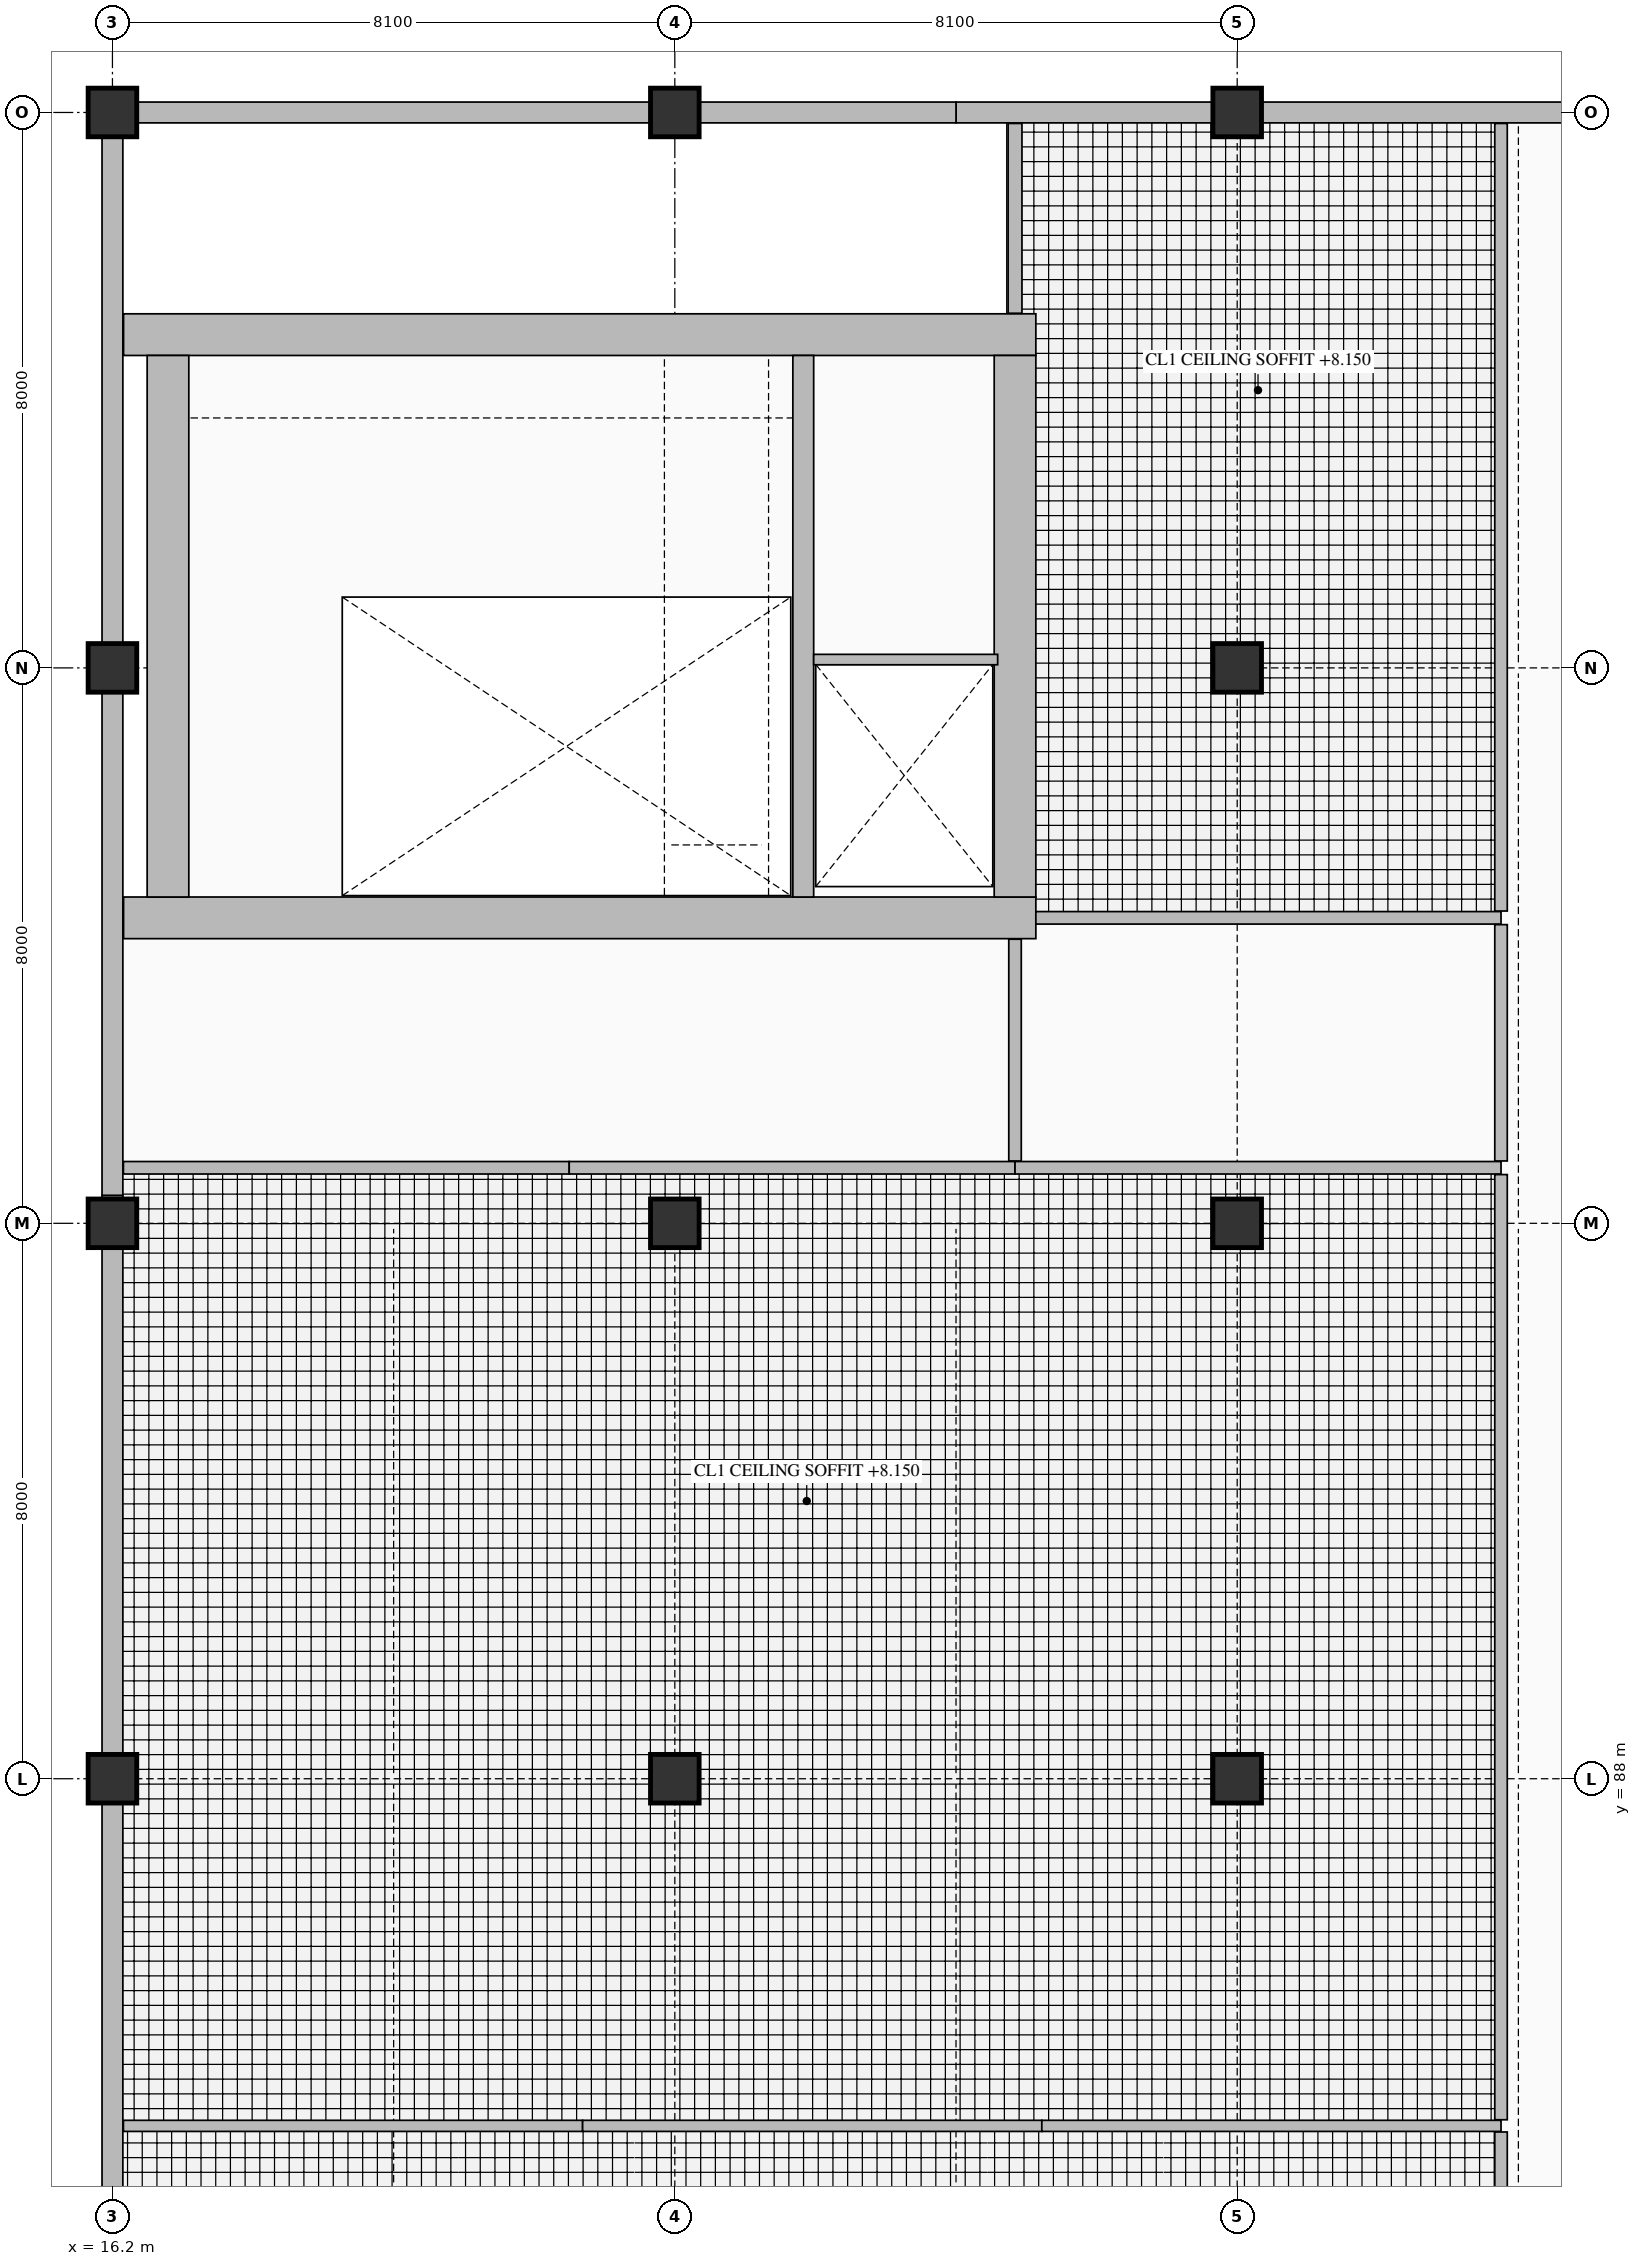
"""IFC4 building model, lengths in metres.
Left out: names, types, materials, properties, quantities, classifications, styles, units other than length and angle.
Written with IfcOpenShell. Run it as: python <this file> out.ifc"""

import sys

from ifc_helpers import new_model, si_unit, direction, frame, frame_2d, origin, origin_2d, place, context, subcontext, project, spatial, rectangle, extrude, element, fill, save


model = new_model("IFC4")
c1 = context("Model", 3, precision=1e-05, world=origin(), true_north=direction((0.0, 1.0)))
c2 = subcontext(c1, "Body", "Model", "MODEL_VIEW")
j1 = project(units=[si_unit("LENGTHUNIT", "METRE"), si_unit("PLANEANGLEUNIT", "RADIAN")], contexts=[c1])
p1 = place(None, origin())
s1 = spatial("IfcSite", under=j1, at=p1, CompositionType="ELEMENT")
p2 = place(p1, origin())
s2 = spatial("IfcBuilding", under=s1, at=p2, CompositionType="ELEMENT")
p3 = place(p2, frame((0.0, 0.0, 5.4)))
s3 = spatial("IfcBuildingStorey", under=s2, at=p3, CompositionType="ELEMENT", Elevation=5.4)
p4 = place(p3, frame((16.36, 100.4, 0.0), z_axis=(0.0, 0.0, 1.0), x_axis=(1.0, 0.0, 0.0)))
e1 = element("IfcWall", 1, at=p4, inside=s3, PredefinedType="SHEAR", context=c2, shape_type="SweptSolid", body=[
    extrude(rectangle(XDim=13.14, YDim=0.6, at=frame_2d((6.57, 0.0))), origin(), (0.0, 0.0, 1.0), 4.8),
])
p5 = place(p4, frame((1.39, 0.0, 0.0)))
e2 = element("IfcOpeningElement", 2, at=p5, cuts=e1, PredefinedType="OPENING", context=c2, shape_type="SweptSolid", body=[
    extrude(rectangle(XDim=1.15, YDim=2.25, at=frame_2d((0.575, 1.125))), frame((0.0, 0.31, 0.0), z_axis=(0.0, -1.0, 0.0), x_axis=(1.0, 0.0, 0.0)), (0.0, 0.0, 1.0), 0.62),
])
p6 = place(p4, frame((10.695, 0.0, 0.0)))
e3 = element("IfcOpeningElement", 3, at=p6, cuts=e1, PredefinedType="OPENING", context=c2, shape_type="SweptSolid", body=[
    extrude(rectangle(XDim=1.1, YDim=2.2, at=frame_2d((0.55, 1.1))), frame((0.0, 0.31, 0.0), z_axis=(0.0, -1.0, 0.0), x_axis=(1.0, 0.0, 0.0)), (0.0, 0.0, 1.0), 0.62),
])
p7 = place(p3, frame((16.36, 108.8, 0.0), z_axis=(0.0, 0.0, 1.0), x_axis=(1.0, 0.0, 0.0)))
e4 = element("IfcWall", 4, at=p7, inside=s3, PredefinedType="SHEAR", context=c2, shape_type="SweptSolid", body=[
    extrude(rectangle(XDim=13.14, YDim=0.6, at=frame_2d((6.57, 0.0))), origin(), (0.0, 0.0, 1.0), 4.8),
])
for number, where, z_axis, x_axis in (
    (5, (17.0, 100.7, 0.0), (0.0, 0.0, 1.0), (0.0, 1.0, 0.0)),
    (6, (29.2, 100.7, 0.0), (0.0, 0.0, 1.0), (0.0, 1.0, 0.0)),
):
    element("IfcWall", number, at=place(p3, frame(where, z_axis=z_axis, x_axis=x_axis)), inside=s3, PredefinedType="SHEAR", context=c2, shape_type="SweptSolid", body=[
        extrude(rectangle(XDim=7.8, YDim=0.6, at=frame_2d((3.9, 0.0))), origin(), (0.0, 0.0, 1.0), 4.8),
    ])
p8 = place(p3, frame((26.15, 100.7, 0.0), z_axis=(0.0, 0.0, 1.0), x_axis=(0.0, 1.0, 0.0)))
e7 = element("IfcWall", 7, at=p8, inside=s3, PredefinedType="SHEAR", context=c2, shape_type="SweptSolid", body=[
    extrude(rectangle(XDim=7.8, YDim=0.3, at=frame_2d((3.9, 0.0))), origin(), (0.0, 0.0, 1.0), 4.8),
])
for number, where, z_axis, x_axis in (
    (8, (16.2, 88.0, 0.0), (0.0, 0.0, 1.0), (1.0, 0.0, 0.0)),
    (9, (16.2, 96.0, 0.0), (0.0, 0.0, 1.0), (1.0, 0.0, 0.0)),
    (10, (16.2, 104.0, 0.0), (0.0, 0.0, 1.0), (1.0, 0.0, 0.0)),
    (11, (16.2, 112.0, 0.0), (0.0, 0.0, 1.0), (1.0, 0.0, 0.0)),
    (12, (24.3, 88.0, 0.0), (0.0, 0.0, 1.0), (1.0, 0.0, 0.0)),
    (13, (24.3, 96.0, 0.0), (0.0, 0.0, 1.0), (1.0, 0.0, 0.0)),
    (14, (24.3, 112.0, 0.0), (0.0, 0.0, 1.0), (1.0, 0.0, 0.0)),
    (15, (32.4, 88.0, 0.0), (0.0, 0.0, 1.0), (1.0, 0.0, 0.0)),
    (16, (32.4, 96.0, 0.0), (0.0, 0.0, 1.0), (1.0, 0.0, 0.0)),
    (17, (32.4, 104.0, 0.0), (0.0, 0.0, 1.0), (1.0, 0.0, 0.0)),
    (18, (32.4, 112.0, 0.0), (0.0, 0.0, 1.0), (1.0, 0.0, 0.0)),
):
    element("IfcColumn", number, at=place(p3, frame(where, z_axis=z_axis, x_axis=x_axis)), inside=s3, PredefinedType="COLUMN", context=c2, shape_type="SweptSolid", body=[
        extrude(rectangle(XDim=0.7, YDim=0.7, at=origin_2d()), origin(), (0.0, 0.0, 1.0), 4.8),
    ])
p9 = place(p3, frame((40.5, 112.0, 0.0), z_axis=(0.0, 0.0, 1.0), x_axis=(-1.0, 0.0, 0.0)))
e19 = element("IfcWall", 19, at=p9, inside=s3, PredefinedType="SOLIDWALL", context=c2, shape_type="SweptSolid", body=[
    extrude(rectangle(XDim=12.15, YDim=0.3, at=frame_2d((6.075, 0.0))), origin(), (0.0, 0.0, 1.0), 3.812),
])
p10 = place(p9, frame((5.4, 0.0, 0.85)))
e20 = element("IfcOpeningElement", 20, at=p10, cuts=e19, PredefinedType="OPENING", context=c2, shape_type="SweptSolid", body=[
    extrude(rectangle(XDim=0.9, YDim=2.1, at=frame_2d((0.45, 1.05))), frame((0.0, 0.16, 0.0), z_axis=(0.0, -1.0, 0.0), x_axis=(1.0, 0.0, 0.0)), (0.0, 0.0, 1.0), 0.32),
])
p11 = place(p3, frame((28.35, 112.0, 0.0), z_axis=(0.0, 0.0, 1.0), x_axis=(-1.0, 0.0, 0.0)))
e21 = element("IfcWall", 21, at=p11, inside=s3, PredefinedType="SOLIDWALL", context=c2, shape_type="SweptSolid", body=[
    extrude(rectangle(XDim=12.15, YDim=0.3, at=frame_2d((6.075, 0.0))), origin(), (0.0, 0.0, 1.0), 3.812),
])
p12 = place(p11, frame((5.4, 0.0, 0.85)))
e22 = element("IfcOpeningElement", 22, at=p12, cuts=e21, PredefinedType="OPENING", context=c2, shape_type="SweptSolid", body=[
    extrude(rectangle(XDim=0.9, YDim=2.4, at=frame_2d((0.45, 1.2))), frame((0.0, 0.16, 0.0), z_axis=(0.0, -1.0, 0.0), x_axis=(1.0, 0.0, 0.0)), (0.0, 0.0, 1.0), 0.32),
])
p13 = place(p3, frame((16.2, 112.0, 0.0), z_axis=(0.0, 0.0, 1.0), x_axis=(0.0, -1.0, 0.0)))
e23 = element("IfcWall", 23, at=p13, inside=s3, PredefinedType="SOLIDWALL", context=c2, shape_type="SweptSolid", body=[
    extrude(rectangle(XDim=15.6, YDim=0.3, at=frame_2d((7.8, 0.0))), origin(), (0.0, 0.0, 1.0), 3.912),
])
p14 = place(p3, frame((16.2, 96.4, 0.0), z_axis=(0.0, 0.0, 1.0), x_axis=(0.0, -1.0, 0.0)))
e24 = element("IfcWall", 24, at=p14, inside=s3, PredefinedType="SOLIDWALL", context=c2, shape_type="SweptSolid", body=[
    extrude(rectangle(XDim=15.6, YDim=0.3, at=frame_2d((7.8, 0.0))), origin(), (0.0, 0.0, 1.0), 3.912),
])
p15 = place(p14, frame((4.5, 0.0, 0.95)))
e25 = element("IfcOpeningElement", 25, at=p15, cuts=e24, PredefinedType="OPENING", context=c2, shape_type="SweptSolid", body=[
    extrude(rectangle(XDim=1.2, YDim=1.8, at=frame_2d((0.6, 0.9))), frame((0.0, 0.16, 0.0), z_axis=(0.0, -1.0, 0.0), x_axis=(1.0, 0.0, 0.0)), (0.0, 0.0, 1.0), 0.32),
])
p16 = place(p3, frame((26.3, 104.12, 0.0), z_axis=(0.0, 0.0, 1.0), x_axis=(1.0, 0.0, 0.0)))
e26 = element("IfcWall", 26, at=p16, inside=s3, PredefinedType="PARTITIONING", context=c2, shape_type="SweptSolid", body=[
    extrude(rectangle(XDim=2.65, YDim=0.15, at=frame_2d((1.325, 0.0))), origin(), (0.0, 0.0, 1.0), 4.52),
])
for number, where, z_axis, x_axis in (
    (27, (16.358, 83.0, 0.0), (0.0, 0.0, 1.0), (1.0, 0.0, 0.0)),
    (28, (22.972, 83.0, 0.0), (0.0, 0.0, 1.0), (1.0, 0.0, 0.0)),
    (29, (29.586, 83.0, 0.0), (0.0, 0.0, 1.0), (1.0, 0.0, 0.0)),
):
    element("IfcWall", number, at=place(p3, frame(where, z_axis=z_axis, x_axis=x_axis)), inside=s3, PredefinedType="PARTITIONING", context=c2, shape_type="SweptSolid", body=[
        extrude(rectangle(XDim=6.614, YDim=0.16, at=frame_2d((3.307, 0.0))), origin(), (0.0, 0.0, 1.0), 4.52),
    ])
p17 = place(p3, frame((16.358, 96.8, 0.0), z_axis=(0.0, 0.0, 1.0), x_axis=(1.0, 0.0, 0.0)))
e30 = element("IfcWall", 30, at=p17, inside=s3, PredefinedType="PARTITIONING", context=c2, shape_type="SweptSolid", body=[
    extrude(rectangle(XDim=6.421, YDim=0.18, at=frame_2d((3.21, 0.0))), origin(), (0.0, 0.0, 1.0), 4.52),
])
p18 = place(p3, frame((22.779, 96.8, 0.0), z_axis=(0.0, 0.0, 1.0), x_axis=(1.0, 0.0, 0.0)))
e31 = element("IfcWall", 31, at=p18, inside=s3, PredefinedType="PARTITIONING", context=c2, shape_type="SweptSolid", body=[
    extrude(rectangle(XDim=6.421, YDim=0.18, at=frame_2d((3.21, 0.0))), origin(), (0.0, 0.0, 1.0), 4.52),
])
p19 = place(p3, frame((29.2, 96.8, 0.0), z_axis=(0.0, 0.0, 1.0), x_axis=(1.0, 0.0, 0.0)))
e32 = element("IfcWall", 32, at=p19, inside=s3, PredefinedType="PARTITIONING", context=c2, shape_type="SweptSolid", body=[
    extrude(rectangle(XDim=7.0, YDim=0.18, at=frame_2d((3.5, 0.0))), origin(), (0.0, 0.0, 1.0), 4.52),
])
p20 = place(p3, frame((29.5, 100.4, 0.0), z_axis=(0.0, 0.0, 1.0), x_axis=(1.0, 0.0, 0.0)))
e33 = element("IfcWall", 33, at=p20, inside=s3, PredefinedType="PARTITIONING", context=c2, shape_type="SweptSolid", body=[
    extrude(rectangle(XDim=6.7, YDim=0.18, at=frame_2d((3.35, 0.0))), origin(), (0.0, 0.0, 1.0), 4.52),
])
p21 = place(p3, frame((29.2, 96.898, 0.0), z_axis=(0.0, 0.0, 1.0), x_axis=(0.0, 1.0, 0.0)))
e34 = element("IfcWall", 34, at=p21, inside=s3, PredefinedType="PARTITIONING", context=c2, shape_type="SweptSolid", body=[
    extrude(rectangle(XDim=3.194, YDim=0.18, at=frame_2d((1.597, 0.0))), origin(), (0.0, 0.0, 1.0), 4.52),
])
p22 = place(p21, frame((0.997, 0.0, 0.0)))
e35 = element("IfcOpeningElement", 35, at=p22, cuts=e34, PredefinedType="OPENING", context=c2, shape_type="SweptSolid", body=[
    extrude(rectangle(XDim=1.2, YDim=2.2, at=frame_2d((0.6, 1.1))), frame((0.0, 0.1, 0.0), z_axis=(0.0, -1.0, 0.0), x_axis=(1.0, 0.0, 0.0)), (0.0, 0.0, 1.0), 0.2),
])
p23 = place(p3, frame((29.2, 109.108, 0.0), z_axis=(0.0, 0.0, 1.0), x_axis=(0.0, 1.0, 0.0)))
e36 = element("IfcWall", 36, at=p23, inside=s3, PredefinedType="PARTITIONING", context=c2, shape_type="SweptSolid", body=[
    extrude(rectangle(XDim=2.734, YDim=0.2, at=frame_2d((1.367, 0.0))), origin(), (0.0, 0.0, 1.0), 4.52),
])
p24 = place(p3, frame((36.2, 68.888, 0.0), z_axis=(0.0, 0.0, 1.0), x_axis=(0.0, 1.0, 0.0)))
e37 = element("IfcWall", 37, at=p24, inside=s3, PredefinedType="PARTITIONING", context=c2, shape_type="SweptSolid", body=[
    extrude(rectangle(XDim=14.024, YDim=0.18, at=frame_2d((7.012, 0.0))), origin(), (0.0, 0.0, 1.0), 4.165),
])
p25 = place(p24, frame((6.512, 0.0, 0.0)))
e38 = element("IfcOpeningElement", 38, at=p25, cuts=e37, PredefinedType="OPENING", context=c2, shape_type="SweptSolid", body=[
    extrude(rectangle(XDim=1.0, YDim=2.2, at=frame_2d((0.5, 1.1))), frame((0.0, 0.1, 0.0), z_axis=(0.0, -1.0, 0.0), x_axis=(1.0, 0.0, 0.0)), (0.0, 0.0, 1.0), 0.2),
])
p26 = place(p3, frame((36.2, 83.088, 0.0), z_axis=(0.0, 0.0, 1.0), x_axis=(0.0, 1.0, 0.0)))
e39 = element("IfcWall", 39, at=p26, inside=s3, PredefinedType="PARTITIONING", context=c2, shape_type="SweptSolid", body=[
    extrude(rectangle(XDim=13.614, YDim=0.18, at=frame_2d((6.807, 0.0))), origin(), (0.0, 0.0, 1.0), 4.165),
])
p27 = place(p26, frame((6.307, 0.0, 0.0)))
e40 = element("IfcOpeningElement", 40, at=p27, cuts=e39, PredefinedType="OPENING", context=c2, shape_type="SweptSolid", body=[
    extrude(rectangle(XDim=1.0, YDim=2.2, at=frame_2d((0.5, 1.1))), frame((0.0, 0.1, 0.0), z_axis=(0.0, -1.0, 0.0), x_axis=(1.0, 0.0, 0.0)), (0.0, 0.0, 1.0), 0.2),
])
p28 = place(p3, frame((36.2, 96.898, 0.0), z_axis=(0.0, 0.0, 1.0), x_axis=(0.0, 1.0, 0.0)))
e41 = element("IfcWall", 41, at=p28, inside=s3, PredefinedType="PARTITIONING", context=c2, shape_type="SweptSolid", body=[
    extrude(rectangle(XDim=3.404, YDim=0.18, at=frame_2d((1.702, 0.0))), origin(), (0.0, 0.0, 1.0), 4.158),
])
p29 = place(p28, frame((1.152, 0.0, 0.0)))
e42 = element("IfcOpeningElement", 42, at=p29, cuts=e41, PredefinedType="OPENING", context=c2, shape_type="SweptSolid", body=[
    extrude(rectangle(XDim=1.1, YDim=2.2, at=frame_2d((0.55, 1.1))), frame((0.0, 0.1, 0.0), z_axis=(0.0, -1.0, 0.0), x_axis=(1.0, 0.0, 0.0)), (0.0, 0.0, 1.0), 0.2),
])
p30 = place(p3, frame((36.2, 100.498, 0.0), z_axis=(0.0, 0.0, 1.0), x_axis=(0.0, 1.0, 0.0)))
e43 = element("IfcWall", 43, at=p30, inside=s3, PredefinedType="PARTITIONING", context=c2, shape_type="SweptSolid", body=[
    extrude(rectangle(XDim=11.344, YDim=0.18, at=frame_2d((5.672, 0.0))), origin(), (0.0, 0.0, 1.0), 4.158),
])
p31 = place(p30, frame((5.197, 0.0, 0.0)))
e44 = element("IfcOpeningElement", 44, at=p31, cuts=e43, PredefinedType="OPENING", context=c2, shape_type="SweptSolid", body=[
    extrude(rectangle(XDim=0.95, YDim=2.15, at=frame_2d((0.475, 1.075))), frame((0.0, 0.1, 0.0), z_axis=(0.0, -1.0, 0.0), x_axis=(1.0, 0.0, 0.0)), (0.0, 0.0, 1.0), 0.2),
])
p32 = place(p10, origin())
e45 = element("IfcWindow", 45, at=p32, inside=s3, PartitioningType="SINGLE_PANEL", PredefinedType="WINDOW", context=c2, shape_type="SweptSolid", body=[
    extrude(rectangle(XDim=0.9, YDim=2.1, at=frame_2d((0.45, 1.05))), frame((0.0, 0.03, 0.0), z_axis=(0.0, -1.0, 0.0), x_axis=(1.0, 0.0, 0.0)), (0.0, 0.0, 1.0), 0.06),
])
fill(e20, e45)
p33 = place(p12, origin())
e46 = element("IfcWindow", 46, at=p33, inside=s3, PartitioningType="DOUBLE_PANEL_HORIZONTAL", PredefinedType="WINDOW", context=c2, shape_type="SweptSolid", body=[
    extrude(rectangle(XDim=0.9, YDim=2.4, at=frame_2d((0.45, 1.2))), frame((0.0, 0.03, 0.0), z_axis=(0.0, -1.0, 0.0), x_axis=(1.0, 0.0, 0.0)), (0.0, 0.0, 1.0), 0.06),
])
fill(e22, e46)
p34 = place(p15, origin())
e47 = element("IfcWindow", 47, at=p34, inside=s3, PartitioningType="SINGLE_PANEL", PredefinedType="WINDOW", context=c2, shape_type="SweptSolid", body=[
    extrude(rectangle(XDim=1.2, YDim=1.8, at=frame_2d((0.6, 0.9))), frame((0.0, 0.03, 0.0), z_axis=(0.0, -1.0, 0.0), x_axis=(1.0, 0.0, 0.0)), (0.0, 0.0, 1.0), 0.06),
])
fill(e25, e47)
p35 = place(p5, origin())
e48 = element("IfcDoor", 48, at=p35, inside=s3, OperationType="SINGLE_SWING_LEFT", PredefinedType="DOOR", context=c2, shape_type="SweptSolid", body=[
    extrude(rectangle(XDim=1.15, YDim=2.25, at=frame_2d((0.575, 1.125))), frame((0.0, 0.025, 0.0), z_axis=(0.0, -1.0, 0.0), x_axis=(1.0, 0.0, 0.0)), (0.0, 0.0, 1.0), 0.05),
])
fill(e2, e48)
p36 = place(p6, frame((1.1, 0.0, 0.0), z_axis=(0.0, 0.0, 1.0), x_axis=(-1.0, 0.0, 0.0)))
e49 = element("IfcDoor", 49, at=p36, inside=s3, OperationType="DOUBLE_DOOR_SLIDING", PredefinedType="DOOR", context=c2, shape_type="SweptSolid", body=[
    extrude(rectangle(XDim=1.1, YDim=2.2, at=frame_2d((0.55, 1.1))), frame((0.0, 0.025, 0.0), z_axis=(0.0, -1.0, 0.0), x_axis=(1.0, 0.0, 0.0)), (0.0, 0.0, 1.0), 0.05),
])
fill(e3, e49)
p37 = place(p22, frame((1.2, 0.0, 0.0), z_axis=(0.0, 0.0, 1.0), x_axis=(-1.0, 0.0, 0.0)))
e50 = element("IfcDoor", 50, at=p37, inside=s3, OperationType="SINGLE_SWING_RIGHT", PredefinedType="DOOR", context=c2, shape_type="SweptSolid", body=[
    extrude(rectangle(XDim=1.2, YDim=2.2, at=frame_2d((0.6, 1.1))), frame((0.0, 0.025, 0.0), z_axis=(0.0, -1.0, 0.0), x_axis=(1.0, 0.0, 0.0)), (0.0, 0.0, 1.0), 0.05),
])
fill(e35, e50)
p38 = place(p27, origin())
e51 = element("IfcDoor", 51, at=p38, inside=s3, OperationType="SINGLE_SWING_LEFT", PredefinedType="DOOR", context=c2, shape_type="SweptSolid", body=[
    extrude(rectangle(XDim=1.0, YDim=2.2, at=frame_2d((0.5, 1.1))), frame((0.0, 0.025, 0.0), z_axis=(0.0, -1.0, 0.0), x_axis=(1.0, 0.0, 0.0)), (0.0, 0.0, 1.0), 0.05),
])
fill(e40, e51)
p39 = place(p29, origin())
e52 = element("IfcDoor", 52, at=p39, inside=s3, OperationType="SINGLE_SWING_RIGHT", PredefinedType="DOOR", context=c2, shape_type="SweptSolid", body=[
    extrude(rectangle(XDim=1.1, YDim=2.2, at=frame_2d((0.55, 1.1))), frame((0.0, 0.025, 0.0), z_axis=(0.0, -1.0, 0.0), x_axis=(1.0, 0.0, 0.0)), (0.0, 0.0, 1.0), 0.05),
])
fill(e42, e52)
p40 = place(p31, origin())
e53 = element("IfcDoor", 53, at=p40, inside=s3, OperationType="SINGLE_SWING_LEFT", PredefinedType="DOOR", context=c2, shape_type="SweptSolid", body=[
    extrude(rectangle(XDim=0.95, YDim=2.15, at=frame_2d((0.475, 1.075))), frame((0.0, 0.025, 0.0), z_axis=(0.0, -1.0, 0.0), x_axis=(1.0, 0.0, 0.0)), (0.0, 0.0, 1.0), 0.05),
])
fill(e44, e53)
save(model, sys.argv[1])
